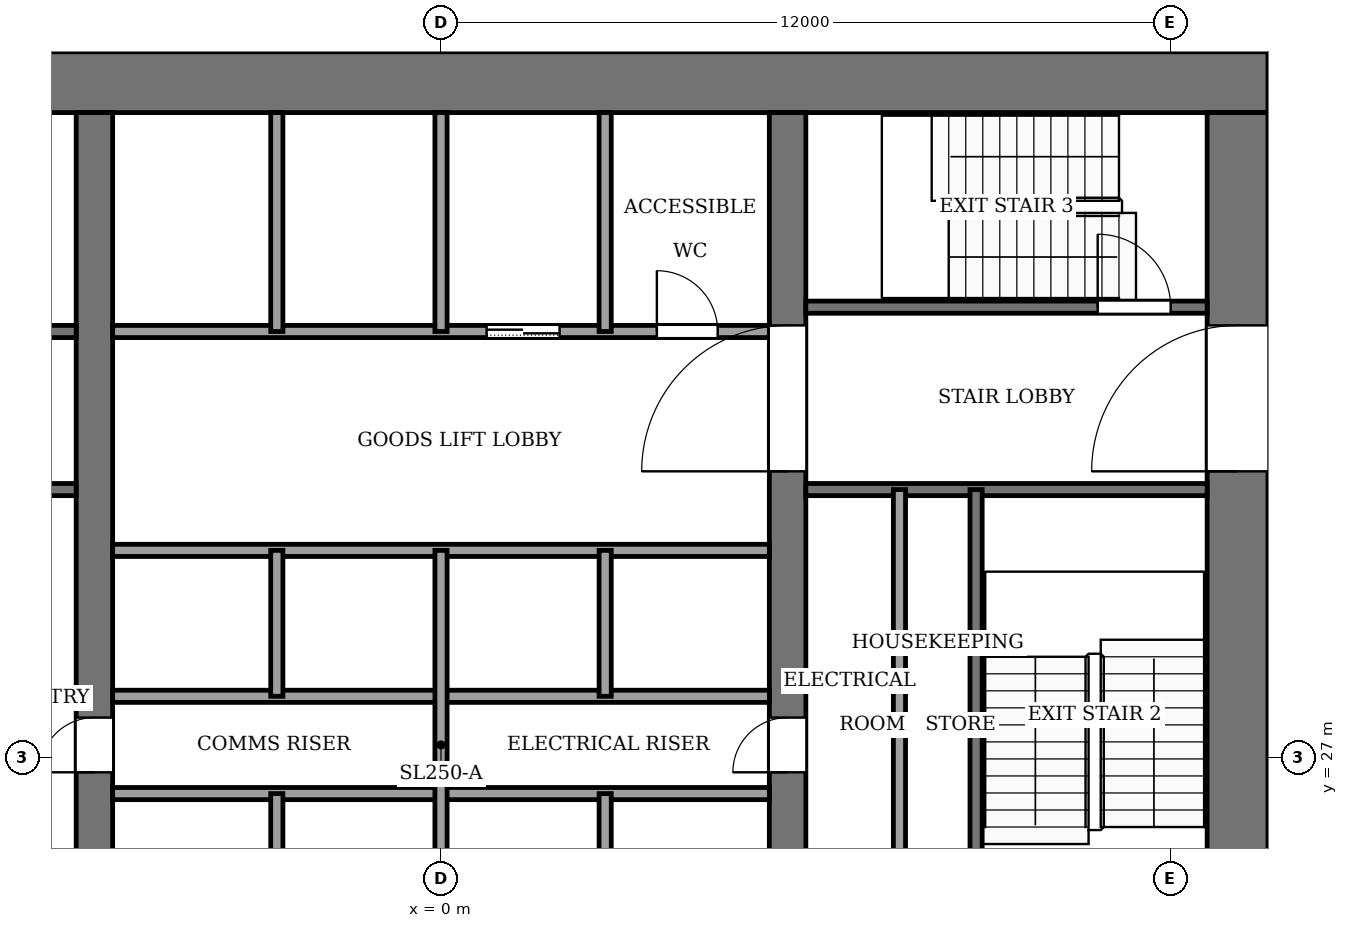
"""IFC4 building model, lengths in metres.
Left out: names, types, materials, properties, quantities, classifications, styles, units other than length and angle.
Written with IfcOpenShell. Run it as: python <this file> out.ifc"""

import sys

from ifc_helpers import new_model, si_unit, direction, frame, frame_2d, origin, place, context, subcontext, project, spatial, rectangle, extrude, element, fill, save


model = new_model("IFC4")
c1 = context("Model", 3, precision=1e-05, world=origin(), true_north=direction((0.0, 1.0)))
c2 = subcontext(c1, "Body", "Model", "MODEL_VIEW")
j1 = project(units=[si_unit("LENGTHUNIT", "METRE"), si_unit("PLANEANGLEUNIT", "RADIAN")], contexts=[c1])
p1 = place(None, origin())
s1 = spatial("IfcSite", under=j1, at=p1, CompositionType="ELEMENT")
p2 = place(p1, origin())
s2 = spatial("IfcBuilding", under=s1, at=p2, CompositionType="ELEMENT")
p3 = place(p2, frame((0.0, 0.0, 134.0)))
s3 = spatial("IfcBuildingStorey", under=s2, at=p3, CompositionType="ELEMENT", Elevation=134.0)
p4 = place(p3, frame((-13.6, 38.1, -0.13), z_axis=(0.0, 0.0, 1.0), x_axis=(1.0, 0.0, 0.0)))
e1 = element("IfcWall", 1, at=p4, inside=s3, PredefinedType="SHEAR", context=c2, shape_type="SweptSolid", body=[
    extrude(rectangle(XDim=27.2, YDim=1.0, at=frame_2d((13.6, 0.0))), origin(), (0.0, 0.0, 1.0), 4.0),
])
p5 = place(p3, frame((13.1, 18.4, -0.13), z_axis=(0.0, 0.0, 1.0), x_axis=(0.0, 1.0, 0.0)))
e2 = element("IfcWall", 2, at=p5, inside=s3, PredefinedType="SHEAR", context=c2, shape_type="SweptSolid", body=[
    extrude(rectangle(XDim=19.2, YDim=1.0, at=frame_2d((9.6, 0.0))), origin(), (0.0, 0.0, 1.0), 4.0),
])
p6 = place(p5, frame((2.8, 0.0, 0.13)))
e3 = element("IfcOpeningElement", 3, at=p6, cuts=e2, PredefinedType="OPENING", context=c2, shape_type="SweptSolid", body=[
    extrude(rectangle(XDim=2.4, YDim=2.4, at=frame_2d((1.2, 1.2))), frame((0.0, 0.51, 0.0), z_axis=(0.0, -1.0, 0.0), x_axis=(1.0, 0.0, 0.0)), (0.0, 0.0, 1.0), 1.02),
])
p7 = place(p5, frame((13.3, 0.0, 0.13)))
e4 = element("IfcOpeningElement", 4, at=p7, cuts=e2, PredefinedType="OPENING", context=c2, shape_type="SweptSolid", body=[
    extrude(rectangle(XDim=2.4, YDim=2.4, at=frame_2d((1.2, 1.2))), frame((0.0, 0.51, 0.0), z_axis=(0.0, -1.0, 0.0), x_axis=(1.0, 0.0, 0.0)), (0.0, 0.0, 1.0), 1.02),
])
p8 = place(p3, frame((-5.7, 18.4, -0.13), z_axis=(0.0, 0.0, 1.0), x_axis=(0.0, 1.0, 0.0)))
e5 = element("IfcWall", 5, at=p8, inside=s3, PredefinedType="SHEAR", context=c2, shape_type="SweptSolid", body=[
    extrude(rectangle(XDim=19.2, YDim=0.6, at=frame_2d((9.6, 0.0))), origin(), (0.0, 0.0, 1.0), 4.0),
])
p9 = place(p8, frame((8.35, 0.0, 0.13)))
e6 = element("IfcOpeningElement", 6, at=p9, cuts=e5, PredefinedType="OPENING", context=c2, shape_type="SweptSolid", body=[
    extrude(rectangle(XDim=0.9, YDim=2.1, at=frame_2d((0.45, 1.05))), frame((0.0, 0.31, 0.0), z_axis=(0.0, -1.0, 0.0), x_axis=(1.0, 0.0, 0.0)), (0.0, 0.0, 1.0), 0.62),
])
p10 = place(p3, frame((5.7, 18.4, -0.13), z_axis=(0.0, 0.0, 1.0), x_axis=(0.0, 1.0, 0.0)))
e7 = element("IfcWall", 7, at=p10, inside=s3, PredefinedType="SHEAR", context=c2, shape_type="SweptSolid", body=[
    extrude(rectangle(XDim=19.2, YDim=0.6, at=frame_2d((9.6, 0.0))), origin(), (0.0, 0.0, 1.0), 4.0),
])
p11 = place(p10, frame((8.35, 0.0, 0.13)))
e8 = element("IfcOpeningElement", 8, at=p11, cuts=e7, PredefinedType="OPENING", context=c2, shape_type="SweptSolid", body=[
    extrude(rectangle(XDim=0.9, YDim=2.1, at=frame_2d((0.45, 1.05))), frame((0.0, 0.31, 0.0), z_axis=(0.0, -1.0, 0.0), x_axis=(1.0, 0.0, 0.0)), (0.0, 0.0, 1.0), 0.62),
])
p12 = place(p10, frame((13.3, 0.0, 0.13)))
e9 = element("IfcOpeningElement", 9, at=p12, cuts=e7, PredefinedType="OPENING", context=c2, shape_type="SweptSolid", body=[
    extrude(rectangle(XDim=2.4, YDim=2.4, at=frame_2d((1.2, 1.2))), frame((0.0, 0.31, 0.0), z_axis=(0.0, -1.0, 0.0), x_axis=(1.0, 0.0, 0.0)), (0.0, 0.0, 1.0), 0.62),
])
for number, where, z_axis, x_axis in (
    (10, (-5.4, 26.4, 0.0), (0.0, 0.0, 1.0), (1.0, 0.0, 0.0)),
    (11, (-5.4, 28.0, 0.0), (0.0, 0.0, 1.0), (1.0, 0.0, 0.0)),
    (12, (-5.4, 30.4, 0.0), (0.0, 0.0, 1.0), (1.0, 0.0, 0.0)),
):
    element("IfcWall", number, at=place(p3, frame(where, z_axis=z_axis, x_axis=x_axis)), inside=s3, PredefinedType="PARTITIONING", context=c2, shape_type="SweptSolid", body=[
        extrude(rectangle(XDim=10.8, YDim=0.2, at=frame_2d((5.4, 0.0))), origin(), (0.0, 0.0, 1.0), 3.87),
    ])
p13 = place(p3, frame((-12.6, 31.4, 0.0), z_axis=(0.0, 0.0, 1.0), x_axis=(1.0, 0.0, 0.0)))
e13 = element("IfcWall", 13, at=p13, inside=s3, PredefinedType="PARTITIONING", context=c2, shape_type="SweptSolid", body=[
    extrude(rectangle(XDim=6.6, YDim=0.2, at=frame_2d((3.3, 0.0))), origin(), (0.0, 0.0, 1.0), 3.87),
])
p14 = place(p13, frame((1.0, 0.0, 0.0)))
e14 = element("IfcOpeningElement", 14, at=p14, cuts=e13, PredefinedType="OPENING", context=c2, shape_type="SweptSolid", body=[
    extrude(rectangle(XDim=1.2, YDim=2.2, at=frame_2d((0.6, 1.1))), frame((0.0, 0.11, 0.0), z_axis=(0.0, -1.0, 0.0), x_axis=(1.0, 0.0, 0.0)), (0.0, 0.0, 1.0), 0.22),
])
p15 = place(p3, frame((6.0, 31.4, 0.0), z_axis=(0.0, 0.0, 1.0), x_axis=(1.0, 0.0, 0.0)))
e15 = element("IfcWall", 15, at=p15, inside=s3, PredefinedType="PARTITIONING", context=c2, shape_type="SweptSolid", body=[
    extrude(rectangle(XDim=6.6, YDim=0.2, at=frame_2d((3.3, 0.0))), origin(), (0.0, 0.0, 1.0), 3.87),
])
p16 = place(p3, frame((-12.6, 34.0, 0.0), z_axis=(0.0, 0.0, 1.0), x_axis=(1.0, 0.0, 0.0)))
e16 = element("IfcWall", 16, at=p16, inside=s3, PredefinedType="PARTITIONING", context=c2, shape_type="SweptSolid", body=[
    extrude(rectangle(XDim=6.6, YDim=0.2, at=frame_2d((3.3, 0.0))), origin(), (0.0, 0.0, 1.0), 3.87),
])
p17 = place(p16, frame((4.7, 0.0, 0.0)))
e17 = element("IfcOpeningElement", 17, at=p17, cuts=e16, PredefinedType="OPENING", context=c2, shape_type="SweptSolid", body=[
    extrude(rectangle(XDim=1.4, YDim=2.2, at=frame_2d((0.7, 1.1))), frame((0.0, 0.11, 0.0), z_axis=(0.0, -1.0, 0.0), x_axis=(1.0, 0.0, 0.0)), (0.0, 0.0, 1.0), 0.22),
])
p18 = place(p16, frame((2.3, 0.0, 0.0)))
e18 = element("IfcOpeningElement", 18, at=p18, cuts=e16, PredefinedType="OPENING", context=c2, shape_type="SweptSolid", body=[
    extrude(rectangle(XDim=1.4, YDim=2.2, at=frame_2d((0.7, 1.1))), frame((0.0, 0.11, 0.0), z_axis=(0.0, -1.0, 0.0), x_axis=(1.0, 0.0, 0.0)), (0.0, 0.0, 1.0), 0.22),
])
p19 = place(p16, frame((0.45, 0.0, 0.0)))
e19 = element("IfcOpeningElement", 19, at=p19, cuts=e16, PredefinedType="OPENING", context=c2, shape_type="SweptSolid", body=[
    extrude(rectangle(XDim=0.9, YDim=2.1, at=frame_2d((0.45, 1.05))), frame((0.0, 0.11, 0.0), z_axis=(0.0, -1.0, 0.0), x_axis=(1.0, 0.0, 0.0)), (0.0, 0.0, 1.0), 0.22),
])
p20 = place(p3, frame((-5.4, 34.0, 0.0), z_axis=(0.0, 0.0, 1.0), x_axis=(1.0, 0.0, 0.0)))
e20 = element("IfcWall", 20, at=p20, inside=s3, PredefinedType="PARTITIONING", context=c2, shape_type="SweptSolid", body=[
    extrude(rectangle(XDim=10.8, YDim=0.2, at=frame_2d((5.4, 0.0))), origin(), (0.0, 0.0, 1.0), 3.87),
])
p21 = place(p20, frame((6.15, 0.0, 0.0)))
e21 = element("IfcOpeningElement", 21, at=p21, cuts=e20, PredefinedType="OPENING", context=c2, shape_type="SweptSolid", body=[
    extrude(rectangle(XDim=1.2, YDim=2.2, at=frame_2d((0.6, 1.1))), frame((0.0, 0.11, 0.0), z_axis=(0.0, -1.0, 0.0), x_axis=(1.0, 0.0, 0.0)), (0.0, 0.0, 1.0), 0.22),
])
p22 = place(p20, frame((8.95, 0.0, 0.0)))
e22 = element("IfcOpeningElement", 22, at=p22, cuts=e20, PredefinedType="OPENING", context=c2, shape_type="SweptSolid", body=[
    extrude(rectangle(XDim=1.0, YDim=2.1, at=frame_2d((0.5, 1.05))), frame((0.0, 0.11, 0.0), z_axis=(0.0, -1.0, 0.0), x_axis=(1.0, 0.0, 0.0)), (0.0, 0.0, 1.0), 0.22),
])
p23 = place(p3, frame((6.0, 34.4, 0.0), z_axis=(0.0, 0.0, 1.0), x_axis=(1.0, 0.0, 0.0)))
e23 = element("IfcWall", 23, at=p23, inside=s3, PredefinedType="PARTITIONING", context=c2, shape_type="SweptSolid", body=[
    extrude(rectangle(XDim=6.6, YDim=0.2, at=frame_2d((3.3, 0.0))), origin(), (0.0, 0.0, 1.0), 3.87),
])
p24 = place(p23, frame((4.8, 0.0, 0.0)))
e24 = element("IfcOpeningElement", 24, at=p24, cuts=e23, PredefinedType="OPENING", context=c2, shape_type="SweptSolid", body=[
    extrude(rectangle(XDim=1.2, YDim=2.2, at=frame_2d((0.6, 1.1))), frame((0.0, 0.11, 0.0), z_axis=(0.0, -1.0, 0.0), x_axis=(1.0, 0.0, 0.0)), (0.0, 0.0, 1.0), 0.22),
])
for number, where, z_axis, x_axis in (
    (25, (-2.7, 24.0, 0.0), (0.0, 0.0, 1.0), (0.0, 1.0, 0.0)),
    (26, (-2.7, 28.0, 0.0), (0.0, 0.0, 1.0), (0.0, 1.0, 0.0)),
):
    element("IfcWall", number, at=place(p3, frame(where, z_axis=z_axis, x_axis=x_axis)), inside=s3, PredefinedType="PARTITIONING", context=c2, shape_type="SweptSolid", body=[
        extrude(rectangle(XDim=2.4, YDim=0.2, at=frame_2d((1.2, 0.0))), origin(), (0.0, 0.0, 1.0), 3.87),
    ])
p25 = place(p3, frame((-2.7, 34.0, 0.0), z_axis=(0.0, 0.0, 1.0), x_axis=(0.0, 1.0, 0.0)))
e27 = element("IfcWall", 27, at=p25, inside=s3, PredefinedType="PARTITIONING", context=c2, shape_type="SweptSolid", body=[
    extrude(rectangle(XDim=3.6, YDim=0.2, at=frame_2d((1.8, 0.0))), origin(), (0.0, 0.0, 1.0), 3.87),
])
p26 = place(p3, frame((0.0, 24.0, 0.0), z_axis=(0.0, 0.0, 1.0), x_axis=(0.0, 1.0, 0.0)))
e28 = element("IfcWall", 28, at=p26, inside=s3, PredefinedType="PARTITIONING", context=c2, shape_type="SweptSolid", body=[
    extrude(rectangle(XDim=6.4, YDim=0.2, at=frame_2d((3.2, 0.0))), origin(), (0.0, 0.0, 1.0), 3.87),
])
p27 = place(p3, frame((0.0, 34.0, 0.0), z_axis=(0.0, 0.0, 1.0), x_axis=(0.0, 1.0, 0.0)))
e29 = element("IfcWall", 29, at=p27, inside=s3, PredefinedType="PARTITIONING", context=c2, shape_type="SweptSolid", body=[
    extrude(rectangle(XDim=3.6, YDim=0.2, at=frame_2d((1.8, 0.0))), origin(), (0.0, 0.0, 1.0), 3.87),
])
for number, where, z_axis, x_axis in (
    (30, (2.7, 24.0, 0.0), (0.0, 0.0, 1.0), (0.0, 1.0, 0.0)),
    (31, (2.7, 28.0, 0.0), (0.0, 0.0, 1.0), (0.0, 1.0, 0.0)),
):
    element("IfcWall", number, at=place(p3, frame(where, z_axis=z_axis, x_axis=x_axis)), inside=s3, PredefinedType="PARTITIONING", context=c2, shape_type="SweptSolid", body=[
        extrude(rectangle(XDim=2.4, YDim=0.2, at=frame_2d((1.2, 0.0))), origin(), (0.0, 0.0, 1.0), 3.87),
    ])
p28 = place(p3, frame((2.7, 34.0, 0.0), z_axis=(0.0, 0.0, 1.0), x_axis=(0.0, 1.0, 0.0)))
e32 = element("IfcWall", 32, at=p28, inside=s3, PredefinedType="PARTITIONING", context=c2, shape_type="SweptSolid", body=[
    extrude(rectangle(XDim=3.6, YDim=0.2, at=frame_2d((1.8, 0.0))), origin(), (0.0, 0.0, 1.0), 3.87),
])
for number, where, z_axis, x_axis in (
    (33, (7.54, 24.0, 0.0), (0.0, 0.0, 1.0), (0.0, 1.0, 0.0)),
    (34, (8.8, 24.0, 0.0), (0.0, 0.0, 1.0), (0.0, 1.0, 0.0)),
):
    element("IfcWall", number, at=place(p3, frame(where, z_axis=z_axis, x_axis=x_axis)), inside=s3, PredefinedType="PARTITIONING", context=c2, shape_type="SweptSolid", body=[
        extrude(rectangle(XDim=7.4, YDim=0.2, at=frame_2d((3.7, 0.0))), origin(), (0.0, 0.0, 1.0), 3.87),
    ])
p29 = place(p21, origin())
e35 = element("IfcDoor", 35, at=p29, inside=s3, OperationType="SLIDING_TO_LEFT", PredefinedType="DOOR", context=c2, shape_type="SweptSolid", body=[
    extrude(rectangle(XDim=1.2, YDim=2.2, at=frame_2d((0.6, 1.1))), frame((0.0, 0.025, 0.0), z_axis=(0.0, -1.0, 0.0), x_axis=(1.0, 0.0, 0.0)), (0.0, 0.0, 1.0), 0.05),
])
fill(e21, e35)
p30 = place(p22, origin())
e36 = element("IfcDoor", 36, at=p30, inside=s3, OperationType="SINGLE_SWING_LEFT", PredefinedType="DOOR", context=c2, shape_type="SweptSolid", body=[
    extrude(rectangle(XDim=1.0, YDim=2.1, at=frame_2d((0.5, 1.05))), frame((0.0, 0.025, 0.0), z_axis=(0.0, -1.0, 0.0), x_axis=(1.0, 0.0, 0.0)), (0.0, 0.0, 1.0), 0.05),
])
fill(e22, e36)
p31 = place(p9, origin())
e37 = element("IfcDoor", 37, at=p31, inside=s3, OperationType="SINGLE_SWING_RIGHT", PredefinedType="DOOR", context=c2, shape_type="SweptSolid", body=[
    extrude(rectangle(XDim=0.9, YDim=2.1, at=frame_2d((0.45, 1.05))), frame((0.0, 0.025, 0.0), z_axis=(0.0, -1.0, 0.0), x_axis=(1.0, 0.0, 0.0)), (0.0, 0.0, 1.0), 0.05),
])
fill(e6, e37)
p32 = place(p11, origin())
e38 = element("IfcDoor", 38, at=p32, inside=s3, OperationType="SINGLE_SWING_LEFT", PredefinedType="DOOR", context=c2, shape_type="SweptSolid", body=[
    extrude(rectangle(XDim=0.9, YDim=2.1, at=frame_2d((0.45, 1.05))), frame((0.0, 0.025, 0.0), z_axis=(0.0, -1.0, 0.0), x_axis=(1.0, 0.0, 0.0)), (0.0, 0.0, 1.0), 0.05),
])
fill(e8, e38)
p33 = place(p24, origin())
e39 = element("IfcDoor", 39, at=p33, inside=s3, OperationType="SINGLE_SWING_LEFT", PredefinedType="DOOR", context=c2, shape_type="SweptSolid", body=[
    extrude(rectangle(XDim=1.2, YDim=2.2, at=frame_2d((0.6, 1.1))), frame((0.0, 0.025, 0.0), z_axis=(0.0, -1.0, 0.0), x_axis=(1.0, 0.0, 0.0)), (0.0, 0.0, 1.0), 0.05),
])
fill(e24, e39)
p34 = place(p12, origin())
e40 = element("IfcDoor", 40, at=p34, inside=s3, OperationType="DOUBLE_DOOR_SINGLE_SWING", PredefinedType="DOOR", context=c2, shape_type="SweptSolid", body=[
    extrude(rectangle(XDim=2.4, YDim=2.4, at=frame_2d((1.2, 1.2))), frame((0.0, 0.025, 0.0), z_axis=(0.0, -1.0, 0.0), x_axis=(1.0, 0.0, 0.0)), (0.0, 0.0, 1.0), 0.05),
])
fill(e9, e40)
p35 = place(p7, origin())
e41 = element("IfcDoor", 41, at=p35, inside=s3, OperationType="DOUBLE_DOOR_SINGLE_SWING", PredefinedType="DOOR", context=c2, shape_type="SweptSolid", body=[
    extrude(rectangle(XDim=2.4, YDim=2.4, at=frame_2d((1.2, 1.2))), frame((0.0, 0.025, 0.0), z_axis=(0.0, -1.0, 0.0), x_axis=(1.0, 0.0, 0.0)), (0.0, 0.0, 1.0), 0.05),
])
fill(e4, e41)
save(model, sys.argv[1])
